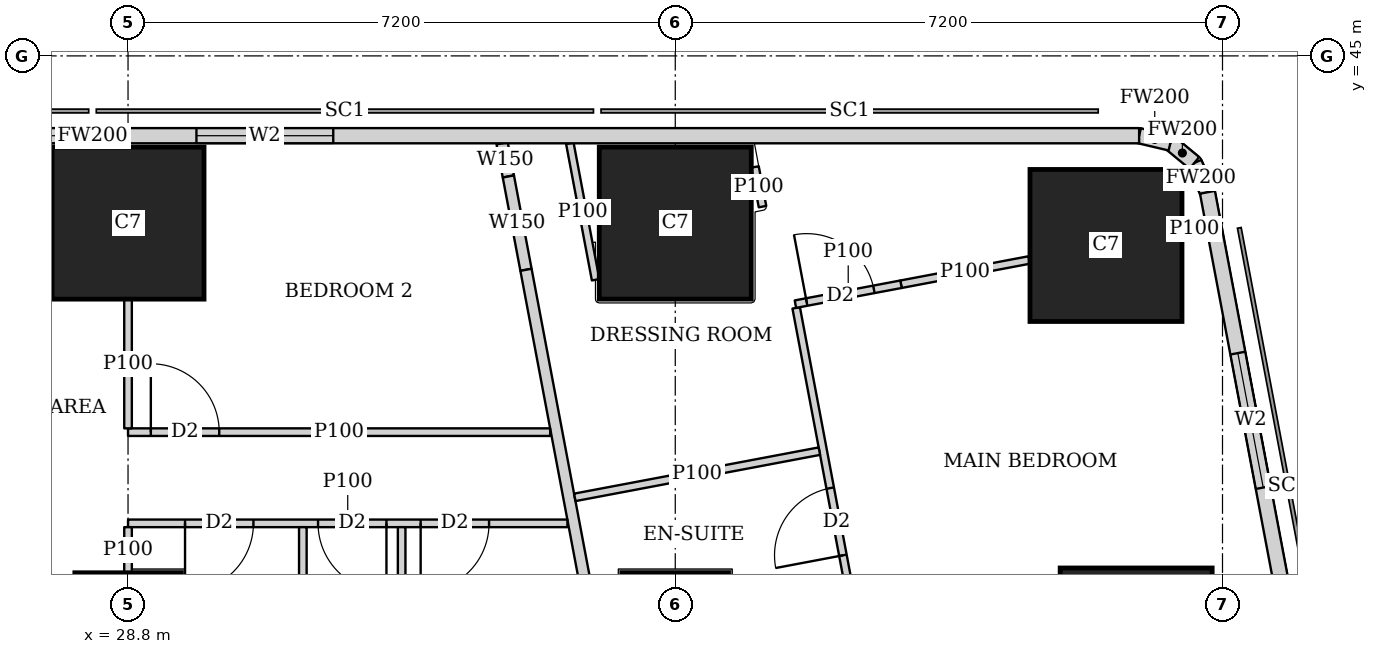
"""IFC4 building model, lengths in metres.
Left out: names, types, materials, properties, quantities, classifications, styles, units other than length and angle.
Written with IfcOpenShell. Run it as: python <this file> out.ifc"""

import sys

from ifc_helpers import new_model, si_unit, direction, frame, frame_2d, origin, origin_2d, place, context, subcontext, project, spatial, rectangle, extrude, element, fill, save


model = new_model("IFC4")
c1 = context("Model", 3, precision=1e-05, world=origin(), true_north=direction((0.0, 1.0)))
c2 = subcontext(c1, "Body", "Model", "MODEL_VIEW")
j1 = project(units=[si_unit("LENGTHUNIT", "METRE"), si_unit("PLANEANGLEUNIT", "RADIAN")], contexts=[c1])
p1 = place(None, origin())
s1 = spatial("IfcSite", under=j1, at=p1, CompositionType="ELEMENT")
p2 = place(p1, origin())
s2 = spatial("IfcBuilding", under=s1, at=p2, CompositionType="ELEMENT")
p3 = place(p2, frame((0.0, 0.0, 289.1)))
s3 = spatial("IfcBuildingStorey", under=s2, at=p3, CompositionType="ELEMENT", Elevation=289.1)
for number, where, z_axis, x_axis in (
    (1, (28.8, 37.5, 0.0), (0.0, 0.0, 1.0), (1.0, 0.0, 0.0)),
    (2, (36.0, 37.5, 0.0), (0.0, 0.0, 1.0), (1.0, 0.0, 0.0)),
):
    element("IfcColumn", number, at=place(p3, frame(where, z_axis=z_axis, x_axis=x_axis)), inside=s3, PredefinedType="COLUMN", context=c2, shape_type="SweptSolid", body=[
        extrude(rectangle(XDim=1.4, YDim=1.4, at=origin_2d()), origin(), (0.0, 0.0, 1.0), 3.75),
    ])
for number, where, z_axis, x_axis in (
    (3, (42.064, 37.263, 0.0), (0.0, 0.0, 1.0), (1.0, 0.0, 0.0)),
    (4, (28.8, 42.8, 0.0), (0.0, 0.0, 1.0), (1.0, 0.0, 0.0)),
    (5, (36.0, 42.8, 0.0), (0.0, 0.0, 1.0), (1.0, 0.0, 0.0)),
    (6, (41.667, 42.506, 0.0), (0.0, 0.0, 1.0), (1.0, 0.0, 0.0)),
):
    element("IfcColumn", number, at=place(p3, frame(where, z_axis=z_axis, x_axis=x_axis)), inside=s3, PredefinedType="COLUMN", context=c2, shape_type="SweptSolid", body=[
        extrude(rectangle(XDim=2.0, YDim=2.0, at=origin_2d()), origin(), (0.0, 0.0, 1.0), 3.75),
    ])
p4 = place(p3, frame((49.684, 7.832, 0.0), z_axis=(0.0, 0.0, 1.0), x_axis=(-0.185616669694, 0.982622232565, 0.0)))
e7 = element("IfcWall", 7, at=p4, inside=s3, PredefinedType="SOLIDWALL", context=c2, shape_type="SweptSolid", body=[
    extrude(rectangle(XDim=36.0, YDim=0.2, at=frame_2d((18.0, 0.0))), origin(), (0.0, 0.0, 1.0), 3.5),
])
p5 = place(p4, frame((2.518, 0.0, 0.9)))
e8 = element("IfcOpeningElement", 8, at=p5, cuts=e7, PredefinedType="OPENING", context=c2, shape_type="SweptSolid", body=[
    extrude(rectangle(XDim=2.4, YDim=1.5, at=frame_2d((1.2, 0.75))), frame((0.0, 0.11, 0.0), z_axis=(0.0, -1.0, 0.0), x_axis=(1.0, 0.0, 0.0)), (0.0, 0.0, 1.0), 0.22),
])
p6 = place(p4, frame((8.444, 0.0, 0.9)))
e9 = element("IfcOpeningElement", 9, at=p6, cuts=e7, PredefinedType="OPENING", context=c2, shape_type="SweptSolid", body=[
    extrude(rectangle(XDim=1.8, YDim=1.5, at=frame_2d((0.9, 0.75))), frame((0.0, 0.11, 0.0), z_axis=(0.0, -1.0, 0.0), x_axis=(1.0, 0.0, 0.0)), (0.0, 0.0, 1.0), 0.22),
])
p7 = place(p4, frame((12.261, 0.0, 0.9)))
e10 = element("IfcOpeningElement", 10, at=p7, cuts=e7, PredefinedType="OPENING", context=c2, shape_type="SweptSolid", body=[
    extrude(rectangle(XDim=1.8, YDim=1.5, at=frame_2d((0.9, 0.75))), frame((0.0, 0.11, 0.0), z_axis=(0.0, -1.0, 0.0), x_axis=(1.0, 0.0, 0.0)), (0.0, 0.0, 1.0), 0.22),
])
p8 = place(p4, frame((16.078, 0.0, 0.9)))
e11 = element("IfcOpeningElement", 11, at=p8, cuts=e7, PredefinedType="OPENING", context=c2, shape_type="SweptSolid", body=[
    extrude(rectangle(XDim=1.8, YDim=1.5, at=frame_2d((0.9, 0.75))), frame((0.0, 0.11, 0.0), z_axis=(0.0, -1.0, 0.0), x_axis=(1.0, 0.0, 0.0)), (0.0, 0.0, 1.0), 0.22),
])
p9 = place(p4, frame((19.894, 0.0, 0.9)))
e12 = element("IfcOpeningElement", 12, at=p9, cuts=e7, PredefinedType="OPENING", context=c2, shape_type="SweptSolid", body=[
    extrude(rectangle(XDim=1.8, YDim=1.5, at=frame_2d((0.9, 0.75))), frame((0.0, 0.11, 0.0), z_axis=(0.0, -1.0, 0.0), x_axis=(1.0, 0.0, 0.0)), (0.0, 0.0, 1.0), 0.22),
])
p10 = place(p4, frame((23.71, 0.0, 0.9)))
e13 = element("IfcOpeningElement", 13, at=p10, cuts=e7, PredefinedType="OPENING", context=c2, shape_type="SweptSolid", body=[
    extrude(rectangle(XDim=1.8, YDim=1.5, at=frame_2d((0.9, 0.75))), frame((0.0, 0.11, 0.0), z_axis=(0.0, -1.0, 0.0), x_axis=(1.0, 0.0, 0.0)), (0.0, 0.0, 1.0), 0.22),
])
p11 = place(p4, frame((27.526, 0.0, 0.9)))
e14 = element("IfcOpeningElement", 14, at=p11, cuts=e7, PredefinedType="OPENING", context=c2, shape_type="SweptSolid", body=[
    extrude(rectangle(XDim=1.8, YDim=1.5, at=frame_2d((0.9, 0.75))), frame((0.0, 0.11, 0.0), z_axis=(0.0, -1.0, 0.0), x_axis=(1.0, 0.0, 0.0)), (0.0, 0.0, 1.0), 0.22),
])
p12 = place(p4, frame((32.046, 0.0, 0.9)))
e15 = element("IfcOpeningElement", 15, at=p12, cuts=e7, PredefinedType="OPENING", context=c2, shape_type="SweptSolid", body=[
    extrude(rectangle(XDim=1.8, YDim=1.5, at=frame_2d((0.9, 0.75))), frame((0.0, 0.11, 0.0), z_axis=(0.0, -1.0, 0.0), x_axis=(1.0, 0.0, 0.0)), (0.0, 0.0, 1.0), 0.22),
])
p13 = place(p3, frame((43.002, 43.206, 0.0), z_axis=(0.0, 0.0, 1.0), x_axis=(-0.40678170573, 0.913525393124, 0.0)))
e16 = element("IfcWall", 16, at=p13, inside=s3, PredefinedType="SOLIDWALL", context=c2, shape_type="SweptSolid", body=[
    extrude(rectangle(XDim=0.423, YDim=0.2, at=frame_2d((0.211, 0.0))), origin(), (0.0, 0.0, 1.0), 3.5),
])
p14 = place(p3, frame((42.83, 43.592, 0.0), z_axis=(0.0, 0.0, 1.0), x_axis=(-0.771190539797, 0.636604391539, 0.0)))
e17 = element("IfcWall", 17, at=p14, inside=s3, PredefinedType="SOLIDWALL", context=c2, shape_type="SweptSolid", body=[
    extrude(rectangle(XDim=0.41, YDim=0.2, at=frame_2d((0.205, 0.0))), origin(), (0.0, 0.0, 1.0), 3.5),
])
p15 = place(p3, frame((42.514, 43.853, 0.0), z_axis=(0.0, 0.0, 1.0), x_axis=(-0.973288080424, 0.229587265555, 0.0)))
e18 = element("IfcWall", 18, at=p15, inside=s3, PredefinedType="SOLIDWALL", context=c2, shape_type="SweptSolid", body=[
    extrude(rectangle(XDim=0.422, YDim=0.2, at=frame_2d((0.211, 0.0))), origin(), (0.0, 0.0, 1.0), 3.5),
])
p16 = place(p3, frame((42.103, 43.95, 0.0), z_axis=(0.0, 0.0, 1.0), x_axis=(-1.0, 0.0, 0.0)))
e19 = element("IfcWall", 19, at=p16, inside=s3, PredefinedType="SOLIDWALL", context=c2, shape_type="SweptSolid", body=[
    extrude(rectangle(XDim=27.54, YDim=0.2, at=frame_2d((13.77, 0.0))), origin(), (0.0, 0.0, 1.0), 3.5),
])
p17 = place(p16, frame((10.603, 0.0, 0.9)))
e20 = element("IfcOpeningElement", 20, at=p17, cuts=e19, PredefinedType="OPENING", context=c2, shape_type="SweptSolid", body=[
    extrude(rectangle(XDim=1.8, YDim=1.5, at=frame_2d((0.9, 0.75))), frame((0.0, 0.11, 0.0), z_axis=(0.0, -1.0, 0.0), x_axis=(1.0, 0.0, 0.0)), (0.0, 0.0, 1.0), 0.22),
])
p18 = place(p16, frame((14.203, 0.0, 0.9)))
e21 = element("IfcOpeningElement", 21, at=p18, cuts=e19, PredefinedType="OPENING", context=c2, shape_type="SweptSolid", body=[
    extrude(rectangle(XDim=1.8, YDim=1.5, at=frame_2d((0.9, 0.75))), frame((0.0, 0.11, 0.0), z_axis=(0.0, -1.0, 0.0), x_axis=(1.0, 0.0, 0.0)), (0.0, 0.0, 1.0), 0.22),
])
p19 = place(p16, frame((17.803, 0.0, 0.9)))
e22 = element("IfcOpeningElement", 22, at=p19, cuts=e19, PredefinedType="OPENING", context=c2, shape_type="SweptSolid", body=[
    extrude(rectangle(XDim=1.8, YDim=1.5, at=frame_2d((0.9, 0.75))), frame((0.0, 0.11, 0.0), z_axis=(0.0, -1.0, 0.0), x_axis=(1.0, 0.0, 0.0)), (0.0, 0.0, 1.0), 0.22),
])
p20 = place(p16, frame((21.403, 0.0, 0.9)))
e23 = element("IfcOpeningElement", 23, at=p20, cuts=e19, PredefinedType="OPENING", context=c2, shape_type="SweptSolid", body=[
    extrude(rectangle(XDim=1.8, YDim=1.5, at=frame_2d((0.9, 0.75))), frame((0.0, 0.11, 0.0), z_axis=(0.0, -1.0, 0.0), x_axis=(1.0, 0.0, 0.0)), (0.0, 0.0, 1.0), 0.22),
])
p21 = place(p3, frame((33.722, 43.85, 0.0), z_axis=(0.0, 0.0, 1.0), x_axis=(0.184886516626, -0.982759877066, 0.0)))
e24 = element("IfcWall", 24, at=p21, inside=s3, PredefinedType="SOLIDWALL", context=c2, shape_type="SweptSolid", body=[
    extrude(rectangle(XDim=0.444, YDim=0.15, at=frame_2d((0.222, 0.0))), origin(), (0.0, 0.0, 1.0), 3.5),
])
p22 = place(p3, frame((33.804, 43.414, 0.0), z_axis=(0.0, 0.0, 1.0), x_axis=(0.185585816539, -0.982628060204, 0.0)))
e25 = element("IfcWall", 25, at=p22, inside=s3, PredefinedType="SOLIDWALL", context=c2, shape_type="SweptSolid", body=[
    extrude(rectangle(XDim=1.25, YDim=0.15, at=frame_2d((0.625, 0.0))), origin(), (0.0, 0.0, 1.0), 2.05),
])
p23 = place(p3, frame((34.036, 42.186, 0.0), z_axis=(0.0, 0.0, 1.0), x_axis=(0.185593518645, -0.9826266055, 0.0)))
e26 = element("IfcWall", 26, at=p23, inside=s3, PredefinedType="SOLIDWALL", context=c2, shape_type="SweptSolid", body=[
    extrude(rectangle(XDim=35.961, YDim=0.15, at=frame_2d((17.98, 0.0))), origin(), (0.0, 0.0, 1.0), 2.5),
])
p24 = place(p23, frame((19.345, 0.0, 0.0)))
e27 = element("IfcOpeningElement", 27, at=p24, cuts=e26, PredefinedType="OPENING", context=c2, shape_type="SweptSolid", body=[
    extrude(rectangle(XDim=1.0, YDim=2.1, at=frame_2d((0.5, 1.05))), frame((0.0, 0.085, 0.0), z_axis=(0.0, -1.0, 0.0), x_axis=(1.0, 0.0, 0.0)), (0.0, 0.0, 1.0), 0.17),
])
p25 = place(p23, frame((33.774, 0.0, 0.0)))
e28 = element("IfcOpeningElement", 28, at=p25, cuts=e26, PredefinedType="OPENING", context=c2, shape_type="SweptSolid", body=[
    extrude(rectangle(XDim=1.0, YDim=2.1, at=frame_2d((0.5, 1.05))), frame((0.0, 0.085, 0.0), z_axis=(0.0, -1.0, 0.0), x_axis=(1.0, 0.0, 0.0)), (0.0, 0.0, 1.0), 0.17),
])
p26 = place(p3, frame((34.952, 42.055, 0.0), z_axis=(0.0, 0.0, 1.0), x_axis=(-0.185490642006, 0.98264603074, 0.0)))
e29 = element("IfcWall", 29, at=p26, inside=s3, PredefinedType="PARTITIONING", context=c2, shape_type="SweptSolid", body=[
    extrude(rectangle(XDim=1.827, YDim=0.1, at=frame_2d((0.914, 0.0))), origin(), (0.0, 0.0, 1.0), 2.05),
])
p27 = place(p3, frame((37.049, 43.539, 0.0), z_axis=(0.0, 0.0, 1.0), x_axis=(0.186119495745, -0.982527115811, 0.0)))
e30 = element("IfcWall", 30, at=p27, inside=s3, PredefinedType="PARTITIONING", context=c2, shape_type="SweptSolid", body=[
    extrude(rectangle(XDim=0.531, YDim=0.1, at=frame_2d((0.266, 0.0))), origin(), (0.0, 0.0, 1.0), 2.05),
])
p28 = place(p3, frame((42.985, 42.755, 0.0), z_axis=(0.0, 0.0, 1.0), x_axis=(-0.98281924824, -0.184570651215, 0.0)))
e31 = element("IfcWall", 31, at=p28, inside=s3, PredefinedType="PARTITIONING", context=c2, shape_type="SweptSolid", body=[
    extrude(rectangle(XDim=0.313, YDim=0.1, at=frame_2d((0.157, 0.0))), origin(), (0.0, 0.0, 1.0), 3.5),
])
p29 = place(p3, frame((40.657, 42.315, 0.0), z_axis=(0.0, 0.0, 1.0), x_axis=(-0.982603924403, -0.185713563715, 0.0)))
e32 = element("IfcWall", 32, at=p29, inside=s3, PredefinedType="PARTITIONING", context=c2, shape_type="SweptSolid", body=[
    extrude(rectangle(XDim=1.717, YDim=0.1, at=frame_2d((0.858, 0.0))), origin(), (0.0, 0.0, 1.0), 2.05),
])
p30 = place(p3, frame((38.97, 41.996, 0.0), z_axis=(0.0, 0.0, 1.0), x_axis=(-0.982642648049, -0.185508561084, 0.0)))
e33 = element("IfcWall", 33, at=p30, inside=s3, PredefinedType="PARTITIONING", context=c2, shape_type="SweptSolid", body=[
    extrude(rectangle(XDim=1.413, YDim=0.1, at=frame_2d((0.707, 0.0))), origin(), (0.0, 0.0, 1.0), 3.5),
])
p31 = place(p30, frame((0.363, 0.0, 0.0)))
e34 = element("IfcOpeningElement", 34, at=p31, cuts=e33, PredefinedType="OPENING", context=c2, shape_type="SweptSolid", body=[
    extrude(rectangle(XDim=0.9, YDim=2.1, at=frame_2d((0.45, 1.05))), frame((0.0, 0.06, 0.0), z_axis=(0.0, -1.0, 0.0), x_axis=(1.0, 0.0, 0.0)), (0.0, 0.0, 1.0), 0.12),
])
p32 = place(p3, frame((37.896, 39.8, 0.0), z_axis=(0.0, 0.0, 1.0), x_axis=(-0.982607026909, -0.185697147715, 0.0)))
e35 = element("IfcWall", 35, at=p32, inside=s3, PredefinedType="PARTITIONING", context=c2, shape_type="SweptSolid", body=[
    extrude(rectangle(XDim=3.275, YDim=0.1, at=frame_2d((1.637, 0.0))), origin(), (0.0, 0.0, 1.0), 3.5),
])
p33 = place(p3, frame((37.591, 41.685, 0.0), z_axis=(0.0, 0.0, 1.0), x_axis=(0.185541820726, -0.982636368532, 0.0)))
e36 = element("IfcWall", 36, at=p33, inside=s3, PredefinedType="PARTITIONING", context=c2, shape_type="SweptSolid", body=[
    extrude(rectangle(XDim=16.735, YDim=0.1, at=frame_2d((8.367, 0.0))), origin(), (0.0, 0.0, 1.0), 2.5),
])
p34 = place(p33, frame((2.413, 0.0, 0.0)))
e37 = element("IfcOpeningElement", 37, at=p34, cuts=e36, PredefinedType="OPENING", context=c2, shape_type="SweptSolid", body=[
    extrude(rectangle(XDim=0.9, YDim=2.1, at=frame_2d((0.45, 1.05))), frame((0.0, 0.06, 0.0), z_axis=(0.0, -1.0, 0.0), x_axis=(1.0, 0.0, 0.0)), (0.0, 0.0, 1.0), 0.12),
])
p35 = place(p33, frame((6.713, 0.0, 0.0)))
e38 = element("IfcOpeningElement", 38, at=p35, cuts=e36, PredefinedType="OPENING", context=c2, shape_type="SweptSolid", body=[
    extrude(rectangle(XDim=0.9, YDim=2.1, at=frame_2d((0.45, 1.05))), frame((0.0, 0.06, 0.0), z_axis=(0.0, -1.0, 0.0), x_axis=(1.0, 0.0, 0.0)), (0.0, 0.0, 1.0), 0.12),
])
p36 = place(p33, frame((9.805, 0.0, 0.0)))
e39 = element("IfcOpeningElement", 39, at=p36, cuts=e36, PredefinedType="OPENING", context=c2, shape_type="SweptSolid", body=[
    extrude(rectangle(XDim=0.9, YDim=2.1, at=frame_2d((0.45, 1.05))), frame((0.0, 0.06, 0.0), z_axis=(0.0, -1.0, 0.0), x_axis=(1.0, 0.0, 0.0)), (0.0, 0.0, 1.0), 0.12),
])
p37 = place(p33, frame((11.713, 0.0, 0.0)))
e40 = element("IfcOpeningElement", 40, at=p37, cuts=e36, PredefinedType="OPENING", context=c2, shape_type="SweptSolid", body=[
    extrude(rectangle(XDim=0.9, YDim=2.1, at=frame_2d((0.45, 1.05))), frame((0.0, 0.06, 0.0), z_axis=(0.0, -1.0, 0.0), x_axis=(1.0, 0.0, 0.0)), (0.0, 0.0, 1.0), 0.12),
])
p38 = place(p33, frame((14.426, 0.0, 0.0)))
e41 = element("IfcOpeningElement", 41, at=p38, cuts=e36, PredefinedType="OPENING", context=c2, shape_type="SweptSolid", body=[
    extrude(rectangle(XDim=0.9, YDim=2.1, at=frame_2d((0.45, 1.05))), frame((0.0, 0.06, 0.0), z_axis=(0.0, -1.0, 0.0), x_axis=(1.0, 0.0, 0.0)), (0.0, 0.0, 1.0), 0.12),
])
p39 = place(p3, frame((28.8, 40.1, 0.0), z_axis=(0.0, 0.0, 1.0), x_axis=(0.0, 1.0, 0.0)))
e42 = element("IfcWall", 42, at=p39, inside=s3, PredefinedType="PARTITIONING", context=c2, shape_type="SweptSolid", body=[
    extrude(rectangle(XDim=1.699, YDim=0.1, at=frame_2d((0.85, 0.0))), origin(), (0.0, 0.0, 1.0), 3.5),
])
p40 = place(p3, frame((28.8, 38.201, 0.0), z_axis=(0.0, 0.0, 1.0), x_axis=(0.0, 1.0, 0.0)))
e43 = element("IfcWall", 43, at=p40, inside=s3, PredefinedType="PARTITIONING", context=c2, shape_type="SweptSolid", body=[
    extrude(rectangle(XDim=0.599, YDim=0.1, at=frame_2d((0.3, 0.0))), origin(), (0.0, 0.0, 1.0), 3.5),
])
for number, where, z_axis, x_axis in (
    (44, (32.4, 36.825, 0.0), (0.0, 0.0, 1.0), (0.0, 1.0, 0.0)),
    (45, (31.1, 36.825, 0.0), (0.0, 0.0, 1.0), (0.0, 1.0, 0.0)),
):
    element("IfcWall", number, at=place(p3, frame(where, z_axis=z_axis, x_axis=x_axis)), inside=s3, PredefinedType="PARTITIONING", context=c2, shape_type="SweptSolid", body=[
        extrude(rectangle(XDim=1.975, YDim=0.1, at=frame_2d((0.988, 0.0))), origin(), (0.0, 0.0, 1.0), 3.5),
    ])
p41 = place(p3, frame((28.8, 38.85, 0.0), z_axis=(0.0, 0.0, 1.0), x_axis=(1.0, 0.0, 0.0)))
e46 = element("IfcWall", 46, at=p41, inside=s3, PredefinedType="PARTITIONING", context=c2, shape_type="SweptSolid", body=[
    extrude(rectangle(XDim=5.781, YDim=0.1, at=frame_2d((2.891, 0.0))), origin(), (0.0, 0.0, 1.0), 3.5),
])
p42 = place(p41, frame((0.75, 0.0, 0.0)))
e47 = element("IfcOpeningElement", 47, at=p42, cuts=e46, PredefinedType="OPENING", context=c2, shape_type="SweptSolid", body=[
    extrude(rectangle(XDim=0.9, YDim=2.1, at=frame_2d((0.45, 1.05))), frame((0.0, 0.06, 0.0), z_axis=(0.0, -1.0, 0.0), x_axis=(1.0, 0.0, 0.0)), (0.0, 0.0, 1.0), 0.12),
])
p43 = place(p41, frame((2.5, 0.0, 0.0)))
e48 = element("IfcOpeningElement", 48, at=p43, cuts=e46, PredefinedType="OPENING", context=c2, shape_type="SweptSolid", body=[
    extrude(rectangle(XDim=0.9, YDim=2.1, at=frame_2d((0.45, 1.05))), frame((0.0, 0.06, 0.0), z_axis=(0.0, -1.0, 0.0), x_axis=(1.0, 0.0, 0.0)), (0.0, 0.0, 1.0), 0.12),
])
p44 = place(p41, frame((3.85, 0.0, 0.0)))
e49 = element("IfcOpeningElement", 49, at=p44, cuts=e46, PredefinedType="OPENING", context=c2, shape_type="SweptSolid", body=[
    extrude(rectangle(XDim=0.9, YDim=2.1, at=frame_2d((0.45, 1.05))), frame((0.0, 0.06, 0.0), z_axis=(0.0, -1.0, 0.0), x_axis=(1.0, 0.0, 0.0)), (0.0, 0.0, 1.0), 0.12),
])
p45 = place(p3, frame((28.8, 40.05, 0.0), z_axis=(0.0, 0.0, 1.0), x_axis=(1.0, 0.0, 0.0)))
e50 = element("IfcWall", 50, at=p45, inside=s3, PredefinedType="PARTITIONING", context=c2, shape_type="SweptSolid", body=[
    extrude(rectangle(XDim=5.554, YDim=0.1, at=frame_2d((2.777, 0.0))), origin(), (0.0, 0.0, 1.0), 3.5),
])
p46 = place(p45, frame((0.3, 0.0, 0.0)))
e51 = element("IfcOpeningElement", 51, at=p46, cuts=e50, PredefinedType="OPENING", context=c2, shape_type="SweptSolid", body=[
    extrude(rectangle(XDim=0.9, YDim=2.1, at=frame_2d((0.45, 1.05))), frame((0.0, 0.06, 0.0), z_axis=(0.0, -1.0, 0.0), x_axis=(1.0, 0.0, 0.0)), (0.0, 0.0, 1.0), 0.12),
])
p47 = place(p12, origin())
e52 = element("IfcWindow", 52, at=p47, inside=s3, PartitioningType="SINGLE_PANEL", PredefinedType="WINDOW", context=c2, shape_type="SweptSolid", body=[
    extrude(rectangle(XDim=1.8, YDim=1.5, at=frame_2d((0.9, 0.75))), frame((0.0, 0.03, 0.0), z_axis=(0.0, -1.0, 0.0), x_axis=(1.0, 0.0, 0.0)), (0.0, 0.0, 1.0), 0.06),
])
fill(e15, e52)
p48 = place(p17, origin())
e53 = element("IfcWindow", 53, at=p48, inside=s3, PartitioningType="SINGLE_PANEL", PredefinedType="WINDOW", context=c2, shape_type="SweptSolid", body=[
    extrude(rectangle(XDim=1.8, YDim=1.5, at=frame_2d((0.9, 0.75))), frame((0.0, 0.03, 0.0), z_axis=(0.0, -1.0, 0.0), x_axis=(1.0, 0.0, 0.0)), (0.0, 0.0, 1.0), 0.06),
])
fill(e20, e53)
p49 = place(p18, origin())
e54 = element("IfcWindow", 54, at=p49, inside=s3, PartitioningType="SINGLE_PANEL", PredefinedType="WINDOW", context=c2, shape_type="SweptSolid", body=[
    extrude(rectangle(XDim=1.8, YDim=1.5, at=frame_2d((0.9, 0.75))), frame((0.0, 0.03, 0.0), z_axis=(0.0, -1.0, 0.0), x_axis=(1.0, 0.0, 0.0)), (0.0, 0.0, 1.0), 0.06),
])
fill(e21, e54)
p50 = place(p31, origin())
e55 = element("IfcDoor", 55, at=p50, inside=s3, OperationType="SINGLE_SWING_LEFT", PredefinedType="DOOR", context=c2, shape_type="SweptSolid", body=[
    extrude(rectangle(XDim=0.9, YDim=2.1, at=frame_2d((0.45, 1.05))), frame((0.0, 0.025, 0.0), z_axis=(0.0, -1.0, 0.0), x_axis=(1.0, 0.0, 0.0)), (0.0, 0.0, 1.0), 0.05),
])
fill(e34, e55)
p51 = place(p34, origin())
e56 = element("IfcDoor", 56, at=p51, inside=s3, OperationType="SINGLE_SWING_LEFT", PredefinedType="DOOR", context=c2, shape_type="SweptSolid", body=[
    extrude(rectangle(XDim=0.9, YDim=2.1, at=frame_2d((0.45, 1.05))), frame((0.0, 0.025, 0.0), z_axis=(0.0, -1.0, 0.0), x_axis=(1.0, 0.0, 0.0)), (0.0, 0.0, 1.0), 0.05),
])
fill(e37, e56)
p52 = place(p46, origin())
e57 = element("IfcDoor", 57, at=p52, inside=s3, OperationType="SINGLE_SWING_LEFT", PredefinedType="DOOR", context=c2, shape_type="SweptSolid", body=[
    extrude(rectangle(XDim=0.9, YDim=2.1, at=frame_2d((0.45, 1.05))), frame((0.0, 0.025, 0.0), z_axis=(0.0, -1.0, 0.0), x_axis=(1.0, 0.0, 0.0)), (0.0, 0.0, 1.0), 0.05),
])
fill(e51, e57)
p53 = place(p42, origin())
e58 = element("IfcDoor", 58, at=p53, inside=s3, OperationType="SINGLE_SWING_RIGHT", PredefinedType="DOOR", context=c2, shape_type="SweptSolid", body=[
    extrude(rectangle(XDim=0.9, YDim=2.1, at=frame_2d((0.45, 1.05))), frame((0.0, 0.025, 0.0), z_axis=(0.0, -1.0, 0.0), x_axis=(1.0, 0.0, 0.0)), (0.0, 0.0, 1.0), 0.05),
])
fill(e47, e58)
p54 = place(p43, origin())
e59 = element("IfcDoor", 59, at=p54, inside=s3, OperationType="SINGLE_SWING_LEFT", PredefinedType="DOOR", context=c2, shape_type="SweptSolid", body=[
    extrude(rectangle(XDim=0.9, YDim=2.1, at=frame_2d((0.45, 1.05))), frame((0.0, 0.025, 0.0), z_axis=(0.0, -1.0, 0.0), x_axis=(1.0, 0.0, 0.0)), (0.0, 0.0, 1.0), 0.05),
])
fill(e48, e59)
p55 = place(p44, origin())
e60 = element("IfcDoor", 60, at=p55, inside=s3, OperationType="SINGLE_SWING_RIGHT", PredefinedType="DOOR", context=c2, shape_type="SweptSolid", body=[
    extrude(rectangle(XDim=0.9, YDim=2.1, at=frame_2d((0.45, 1.05))), frame((0.0, 0.025, 0.0), z_axis=(0.0, -1.0, 0.0), x_axis=(1.0, 0.0, 0.0)), (0.0, 0.0, 1.0), 0.05),
])
fill(e49, e60)
save(model, sys.argv[1])
